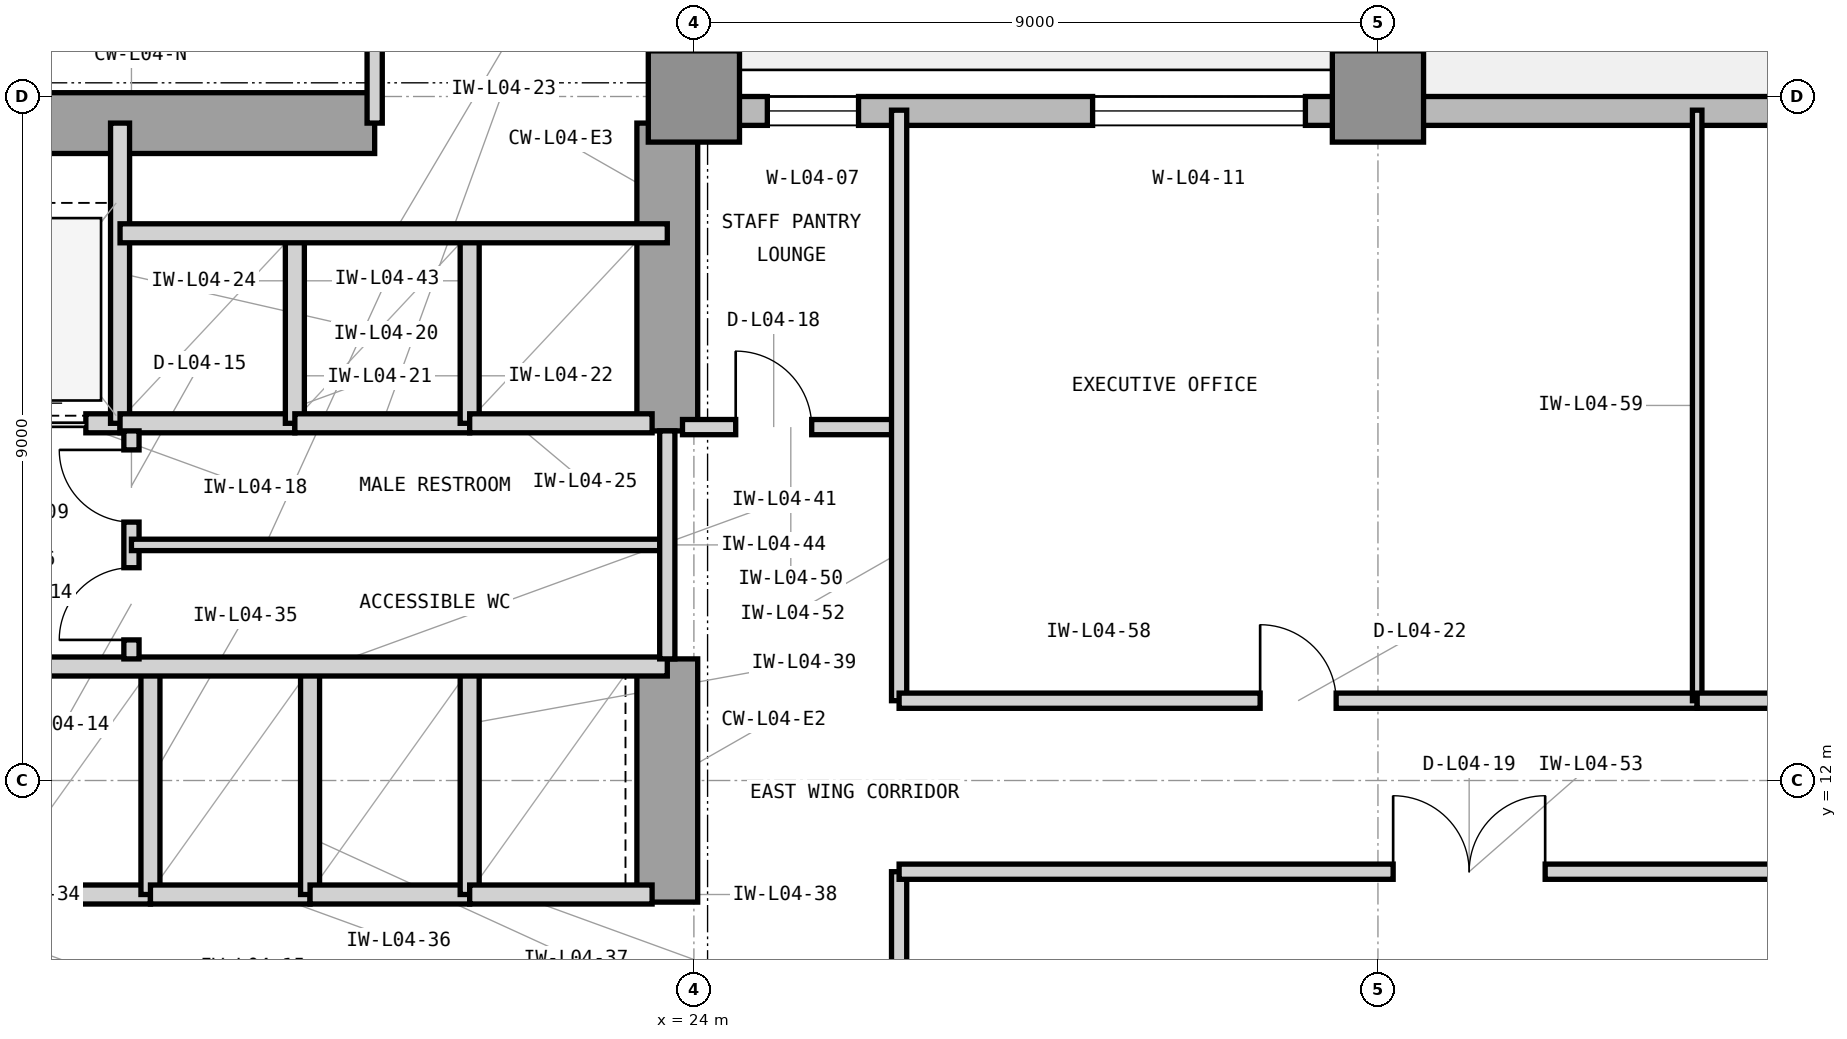
"""IFC4 building model, lengths in metres.
Left out: names, types, materials, properties, quantities, classifications, styles, units other than length and angle.
Written with IfcOpenShell. Run it as: python <this file> out.ifc"""

import sys

from ifc_helpers import new_model, si_unit, direction, frame, frame_2d, origin, origin_2d, place, context, subcontext, project, spatial, rectangle, extrude, element, fill, save


model = new_model("IFC4")
c1 = context("Model", 3, precision=1e-05, world=origin(), true_north=direction((0.0, 1.0)))
c2 = subcontext(c1, "Body", "Model", "MODEL_VIEW")
j1 = project(units=[si_unit("LENGTHUNIT", "METRE"), si_unit("PLANEANGLEUNIT", "RADIAN")], contexts=[c1])
p1 = place(None, origin())
s1 = spatial("IfcSite", under=j1, at=p1, CompositionType="ELEMENT")
p2 = place(p1, origin())
s2 = spatial("IfcBuilding", under=s1, at=p2, CompositionType="ELEMENT")
p3 = place(p2, frame((0.0, 0.0, 21.6)))
s3 = spatial("IfcBuildingStorey", under=s2, at=p3, CompositionType="ELEMENT", Elevation=21.6)
p4 = place(p3, frame((7.475, 20.65, 0.0), z_axis=(0.0, 0.0, 1.0), x_axis=(1.0, 0.0, 0.0)))
e1 = element("IfcWall", 1, at=p4, inside=s3, PredefinedType="SHEAR", context=c2, shape_type="SweptSolid", body=[
    extrude(rectangle(XDim=12.325, YDim=0.8, at=frame_2d((6.163, 0.0))), origin(), (0.0, 0.0, 1.0), 4.2),
])
p5 = place(p3, frame((23.65, 10.4, 0.0), z_axis=(0.0, 0.0, 1.0), x_axis=(0.0, 1.0, 0.0)))
e2 = element("IfcWall", 2, at=p5, inside=s3, PredefinedType="SHEAR", context=c2, shape_type="SweptSolid", body=[
    extrude(rectangle(XDim=3.2, YDim=0.8, at=frame_2d((1.6, 0.0))), origin(), (0.0, 0.0, 1.0), 4.2),
])
p6 = place(p3, frame((23.65, 16.6, 0.0), z_axis=(0.0, 0.0, 1.0), x_axis=(0.0, 1.0, 0.0)))
e3 = element("IfcWall", 3, at=p6, inside=s3, PredefinedType="SHEAR", context=c2, shape_type="SweptSolid", body=[
    extrude(rectangle(XDim=4.05, YDim=0.8, at=frame_2d((2.025, 0.0))), origin(), (0.0, 0.0, 1.0), 4.2),
])
for number, where, z_axis, x_axis in (
    (4, (24.0, 21.0, 0.0), (0.0, 0.0, 1.0), (1.0, 0.0, 0.0)),
    (5, (33.0, 21.0, 0.0), (0.0, 0.0, 1.0), (1.0, 0.0, 0.0)),
):
    element("IfcColumn", number, at=place(p3, frame(where, z_axis=z_axis, x_axis=x_axis)), inside=s3, PredefinedType="COLUMN", context=c2, shape_type="SweptSolid", body=[
        extrude(rectangle(XDim=1.2, YDim=1.2, at=origin_2d()), origin(), (0.0, 0.0, 1.0), 4.2),
    ])
p7 = place(p3, frame((64.4, 20.81, 0.0), z_axis=(0.0, 0.0, 1.0), x_axis=(-1.0, 0.0, 0.0)))
e6 = element("IfcWall", 6, at=p7, inside=s3, PredefinedType="STANDARD", context=c2, shape_type="SweptSolid", body=[
    extrude(rectangle(XDim=40.4, YDim=0.38, at=frame_2d((20.2, 0.0))), origin(), (0.0, 0.0, 1.0), 3.98),
])
p8 = place(p7, frame((23.6, 0.0, 0.0)))
e7 = element("IfcOpeningElement", 7, at=p8, cuts=e6, PredefinedType="OPENING", context=c2, shape_type="SweptSolid", body=[
    extrude(rectangle(XDim=1.8, YDim=2.35, at=frame_2d((0.9, 1.175))), frame((0.0, 0.2, 0.0), z_axis=(0.0, -1.0, 0.0), x_axis=(1.0, 0.0, 0.0)), (0.0, 0.0, 1.0), 0.4),
])
p9 = place(p7, frame((38.234, 0.0, 0.85)))
e8 = element("IfcOpeningElement", 8, at=p9, cuts=e6, PredefinedType="OPENING", context=c2, shape_type="SweptSolid", body=[
    extrude(rectangle(XDim=1.2, YDim=2.45, at=frame_2d((0.6, 1.225))), frame((0.0, 0.2, 0.0), z_axis=(0.0, -1.0, 0.0), x_axis=(1.0, 0.0, 0.0)), (0.0, 0.0, 1.0), 0.4),
])
p10 = place(p7, frame((32.354, 0.0, 0.85)))
e9 = element("IfcOpeningElement", 9, at=p10, cuts=e6, PredefinedType="OPENING", context=c2, shape_type="SweptSolid", body=[
    extrude(rectangle(XDim=2.8, YDim=2.45, at=frame_2d((1.4, 1.225))), frame((0.0, 0.2, 0.0), z_axis=(0.0, -1.0, 0.0), x_axis=(1.0, 0.0, 0.0)), (0.0, 0.0, 1.0), 0.4),
])
p11 = place(p7, frame((18.604, 0.0, 0.85)))
e10 = element("IfcOpeningElement", 10, at=p11, cuts=e6, PredefinedType="OPENING", context=c2, shape_type="SweptSolid", body=[
    extrude(rectangle(XDim=2.8, YDim=2.45, at=frame_2d((1.4, 1.225))), frame((0.0, 0.2, 0.0), z_axis=(0.0, -1.0, 0.0), x_axis=(1.0, 0.0, 0.0)), (0.0, 0.0, 1.0), 0.4),
])
p12 = place(p7, frame((11.154, 0.0, 0.85)))
e11 = element("IfcOpeningElement", 11, at=p12, cuts=e6, PredefinedType="OPENING", context=c2, shape_type="SweptSolid", body=[
    extrude(rectangle(XDim=1.2, YDim=2.45, at=frame_2d((0.6, 1.225))), frame((0.0, 0.2, 0.0), z_axis=(0.0, -1.0, 0.0), x_axis=(1.0, 0.0, 0.0)), (0.0, 0.0, 1.0), 0.4),
])
p13 = place(p3, frame((23.81, 21.0, 0.0), z_axis=(0.0, 0.0, 1.0), x_axis=(0.0, 1.0, 0.0)))
e12 = element("IfcWall", 12, at=p13, inside=s3, PredefinedType="STANDARD", context=c2, shape_type="SweptSolid", body=[
    extrude(rectangle(XDim=28.4, YDim=0.38, at=frame_2d((14.2, 0.0))), origin(), (0.0, 0.0, 1.0), 3.98),
])
p14 = place(p13, frame((10.433, 0.0, 0.85)))
e13 = element("IfcOpeningElement", 13, at=p14, cuts=e12, PredefinedType="OPENING", context=c2, shape_type="SweptSolid", body=[
    extrude(rectangle(XDim=2.8, YDim=2.45, at=frame_2d((1.4, 1.225))), frame((0.0, 0.2, 0.0), z_axis=(0.0, -1.0, 0.0), x_axis=(1.0, 0.0, 0.0)), (0.0, 0.0, 1.0), 0.4),
])
p15 = place(p13, frame((19.034, 0.0, 0.85)))
e14 = element("IfcOpeningElement", 14, at=p15, cuts=e12, PredefinedType="OPENING", context=c2, shape_type="SweptSolid", body=[
    extrude(rectangle(XDim=1.2, YDim=2.45, at=frame_2d((0.6, 1.225))), frame((0.0, 0.2, 0.0), z_axis=(0.0, -1.0, 0.0), x_axis=(1.0, 0.0, 0.0)), (0.0, 0.0, 1.0), 0.4),
])
p16 = place(p3, frame((14.15, 16.7, 0.0), z_axis=(0.0, 0.0, 1.0), x_axis=(1.0, 0.0, 0.0)))
e15 = element("IfcWall", 15, at=p16, inside=s3, PredefinedType="PARTITIONING", context=c2, shape_type="SweptSolid", body=[
    extrude(rectangle(XDim=2.3, YDim=0.25, at=frame_2d((1.15, 0.0))), origin(), (0.0, 0.0, 1.0), 3.426),
])
p17 = place(p16, frame((0.45, 0.0, 0.0)))
e16 = element("IfcOpeningElement", 16, at=p17, cuts=e15, PredefinedType="OPENING", context=c2, shape_type="SweptSolid", body=[
    extrude(rectangle(XDim=1.4, YDim=2.35, at=frame_2d((0.7, 1.175))), frame((0.0, 0.135, 0.0), z_axis=(0.0, -1.0, 0.0), x_axis=(1.0, 0.0, 0.0)), (0.0, 0.0, 1.0), 0.27),
])
p18 = place(p3, frame((16.45, 16.7, 0.0), z_axis=(0.0, 0.0, 1.0), x_axis=(0.0, 1.0, 0.0)))
e17 = element("IfcWall", 17, at=p18, inside=s3, PredefinedType="PARTITIONING", context=c2, shape_type="SweptSolid", body=[
    extrude(rectangle(XDim=3.95, YDim=0.25, at=frame_2d((1.975, 0.0))), origin(), (0.0, 0.0, 1.0), 3.97),
])
p19 = place(p3, frame((16.45, 16.7, 0.0), z_axis=(0.0, 0.0, 1.0), x_axis=(1.0, 0.0, 0.0)))
e18 = element("IfcWall", 18, at=p19, inside=s3, PredefinedType="PARTITIONING", context=c2, shape_type="SweptSolid", body=[
    extrude(rectangle(XDim=2.3, YDim=0.25, at=frame_2d((1.15, 0.0))), origin(), (0.0, 0.0, 1.0), 3.426),
])
p20 = place(p3, frame((18.75, 16.7, 0.0), z_axis=(0.0, 0.0, 1.0), x_axis=(0.0, 1.0, 0.0)))
e19 = element("IfcWall", 19, at=p20, inside=s3, PredefinedType="PARTITIONING", context=c2, shape_type="SweptSolid", body=[
    extrude(rectangle(XDim=2.5, YDim=0.25, at=frame_2d((1.25, 0.0))), origin(), (0.0, 0.0, 1.0), 3.97),
])
p21 = place(p3, frame((18.75, 16.7, 0.0), z_axis=(0.0, 0.0, 1.0), x_axis=(1.0, 0.0, 0.0)))
e20 = element("IfcWall", 20, at=p21, inside=s3, PredefinedType="PARTITIONING", context=c2, shape_type="SweptSolid", body=[
    extrude(rectangle(XDim=2.3, YDim=0.25, at=frame_2d((1.15, 0.0))), origin(), (0.0, 0.0, 1.0), 3.426),
])
p22 = place(p3, frame((21.05, 16.7, 0.0), z_axis=(0.0, 0.0, 1.0), x_axis=(0.0, 1.0, 0.0)))
e21 = element("IfcWall", 21, at=p22, inside=s3, PredefinedType="PARTITIONING", context=c2, shape_type="SweptSolid", body=[
    extrude(rectangle(XDim=2.5, YDim=0.25, at=frame_2d((1.25, 0.0))), origin(), (0.0, 0.0, 1.0), 3.97),
])
p23 = place(p3, frame((21.05, 16.7, 0.0), z_axis=(0.0, 0.0, 1.0), x_axis=(1.0, 0.0, 0.0)))
e22 = element("IfcWall", 22, at=p23, inside=s3, PredefinedType="PARTITIONING", context=c2, shape_type="SweptSolid", body=[
    extrude(rectangle(XDim=2.4, YDim=0.25, at=frame_2d((1.2, 0.0))), origin(), (0.0, 0.0, 1.0), 3.426),
])
p24 = place(p3, frame((16.45, 19.2, 0.0), z_axis=(0.0, 0.0, 1.0), x_axis=(1.0, 0.0, 0.0)))
e23 = element("IfcWall", 23, at=p24, inside=s3, PredefinedType="PARTITIONING", context=c2, shape_type="SweptSolid", body=[
    extrude(rectangle(XDim=7.2, YDim=0.25, at=frame_2d((3.6, 0.0))), origin(), (0.0, 0.0, 1.0), 3.97),
])
p25 = place(p3, frame((14.7, 10.5, 0.0), z_axis=(0.0, 0.0, 1.0), x_axis=(1.0, 0.0, 0.0)))
e24 = element("IfcWall", 24, at=p25, inside=s3, PredefinedType="PARTITIONING", context=c2, shape_type="SweptSolid", body=[
    extrude(rectangle(XDim=2.15, YDim=0.25, at=frame_2d((1.075, 0.0))), origin(), (0.0, 0.0, 1.0), 3.426),
])
p26 = place(p3, frame((16.85, 10.5, 0.0), z_axis=(0.0, 0.0, 1.0), x_axis=(0.0, 1.0, 0.0)))
e25 = element("IfcWall", 25, at=p26, inside=s3, PredefinedType="PARTITIONING", context=c2, shape_type="SweptSolid", body=[
    extrude(rectangle(XDim=3.0, YDim=0.25, at=frame_2d((1.5, 0.0))), origin(), (0.0, 0.0, 1.0), 3.97),
])
p27 = place(p3, frame((16.85, 10.5, 0.0), z_axis=(0.0, 0.0, 1.0), x_axis=(1.0, 0.0, 0.0)))
e26 = element("IfcWall", 26, at=p27, inside=s3, PredefinedType="PARTITIONING", context=c2, shape_type="SweptSolid", body=[
    extrude(rectangle(XDim=2.1, YDim=0.25, at=frame_2d((1.05, 0.0))), origin(), (0.0, 0.0, 1.0), 3.426),
])
p28 = place(p3, frame((18.95, 10.5, 0.0), z_axis=(0.0, 0.0, 1.0), x_axis=(0.0, 1.0, 0.0)))
e27 = element("IfcWall", 27, at=p28, inside=s3, PredefinedType="PARTITIONING", context=c2, shape_type="SweptSolid", body=[
    extrude(rectangle(XDim=3.0, YDim=0.25, at=frame_2d((1.5, 0.0))), origin(), (0.0, 0.0, 1.0), 3.97),
])
p29 = place(p3, frame((18.95, 10.5, 0.0), z_axis=(0.0, 0.0, 1.0), x_axis=(1.0, 0.0, 0.0)))
e28 = element("IfcWall", 28, at=p29, inside=s3, PredefinedType="PARTITIONING", context=c2, shape_type="SweptSolid", body=[
    extrude(rectangle(XDim=2.1, YDim=0.25, at=frame_2d((1.05, 0.0))), origin(), (0.0, 0.0, 1.0), 3.426),
])
p30 = place(p3, frame((21.05, 10.5, 0.0), z_axis=(0.0, 0.0, 1.0), x_axis=(0.0, 1.0, 0.0)))
e29 = element("IfcWall", 29, at=p30, inside=s3, PredefinedType="PARTITIONING", context=c2, shape_type="SweptSolid", body=[
    extrude(rectangle(XDim=3.0, YDim=0.25, at=frame_2d((1.5, 0.0))), origin(), (0.0, 0.0, 1.0), 3.97),
])
p31 = place(p3, frame((21.05, 10.5, 0.0), z_axis=(0.0, 0.0, 1.0), x_axis=(1.0, 0.0, 0.0)))
e30 = element("IfcWall", 30, at=p31, inside=s3, PredefinedType="PARTITIONING", context=c2, shape_type="SweptSolid", body=[
    extrude(rectangle(XDim=2.4, YDim=0.25, at=frame_2d((1.2, 0.0))), origin(), (0.0, 0.0, 1.0), 3.426),
])
p32 = place(p3, frame((14.7, 13.5, 0.0), z_axis=(0.0, 0.0, 1.0), x_axis=(1.0, 0.0, 0.0)))
e31 = element("IfcWall", 31, at=p32, inside=s3, PredefinedType="PARTITIONING", context=c2, shape_type="SweptSolid", body=[
    extrude(rectangle(XDim=8.95, YDim=0.25, at=frame_2d((4.475, 0.0))), origin(), (0.0, 0.0, 1.0), 3.426),
])
p33 = place(p3, frame((16.6, 13.6, 0.0), z_axis=(0.0, 0.0, 1.0), x_axis=(0.0, 1.0, 0.0)))
e32 = element("IfcWall", 32, at=p33, inside=s3, PredefinedType="PARTITIONING", context=c2, shape_type="SweptSolid", body=[
    extrude(rectangle(XDim=3.0, YDim=0.2, at=frame_2d((1.5, 0.0))), origin(), (0.0, 0.0, 1.0), 3.97),
])
p34 = place(p33, frame((0.25, 0.0, 0.0)))
e33 = element("IfcOpeningElement", 33, at=p34, cuts=e32, PredefinedType="OPENING", context=c2, shape_type="SweptSolid", body=[
    extrude(rectangle(XDim=0.95, YDim=2.1, at=frame_2d((0.475, 1.05))), frame((0.0, 0.11, 0.0), z_axis=(0.0, -1.0, 0.0), x_axis=(1.0, 0.0, 0.0)), (0.0, 0.0, 1.0), 0.22),
])
p35 = place(p33, frame((1.8, 0.0, 0.0)))
e34 = element("IfcOpeningElement", 34, at=p35, cuts=e32, PredefinedType="OPENING", context=c2, shape_type="SweptSolid", body=[
    extrude(rectangle(XDim=0.95, YDim=2.1, at=frame_2d((0.475, 1.05))), frame((0.0, 0.11, 0.0), z_axis=(0.0, -1.0, 0.0), x_axis=(1.0, 0.0, 0.0)), (0.0, 0.0, 1.0), 0.22),
])
p36 = place(p3, frame((16.6, 15.1, 0.0), z_axis=(0.0, 0.0, 1.0), x_axis=(1.0, 0.0, 0.0)))
e35 = element("IfcWall", 35, at=p36, inside=s3, PredefinedType="PARTITIONING", context=c2, shape_type="SweptSolid", body=[
    extrude(rectangle(XDim=7.05, YDim=0.15, at=frame_2d((3.525, 0.0))), origin(), (0.0, 0.0, 1.0), 3.97),
])
p37 = place(p3, frame((23.65, 13.6, 0.0), z_axis=(0.0, 0.0, 1.0), x_axis=(0.0, 1.0, 0.0)))
e36 = element("IfcWall", 36, at=p37, inside=s3, PredefinedType="PARTITIONING", context=c2, shape_type="SweptSolid", body=[
    extrude(rectangle(XDim=3.0, YDim=0.2, at=frame_2d((1.5, 0.0))), origin(), (0.0, 0.0, 1.0), 3.97),
])
p38 = place(p3, frame((23.85, 16.65, 0.0), z_axis=(0.0, 0.0, 1.0), x_axis=(1.0, 0.0, 0.0)))
e37 = element("IfcWall", 37, at=p38, inside=s3, PredefinedType="PARTITIONING", context=c2, shape_type="SweptSolid", body=[
    extrude(rectangle(XDim=2.85, YDim=0.2, at=frame_2d((1.425, 0.0))), origin(), (0.0, 0.0, 1.0), 3.97),
])
p39 = place(p38, frame((0.7, 0.0, 0.0)))
e38 = element("IfcOpeningElement", 38, at=p39, cuts=e37, PredefinedType="OPENING", context=c2, shape_type="SweptSolid", body=[
    extrude(rectangle(XDim=1.0, YDim=2.15, at=frame_2d((0.5, 1.075))), frame((0.0, 0.11, 0.0), z_axis=(0.0, -1.0, 0.0), x_axis=(1.0, 0.0, 0.0)), (0.0, 0.0, 1.0), 0.22),
])
p40 = place(p3, frame((26.7, 3.18, 0.0), z_axis=(0.0, 0.0, 1.0), x_axis=(0.0, 1.0, 0.0)))
e39 = element("IfcWall", 39, at=p40, inside=s3, PredefinedType="PARTITIONING", context=c2, shape_type="SweptSolid", body=[
    extrude(rectangle(XDim=7.62, YDim=0.2, at=frame_2d((3.81, 0.0))), origin(), (0.0, 0.0, 1.0), 3.97),
])
p41 = place(p3, frame((26.7, 13.05, 0.0), z_axis=(0.0, 0.0, 1.0), x_axis=(0.0, 1.0, 0.0)))
e40 = element("IfcWall", 40, at=p41, inside=s3, PredefinedType="PARTITIONING", context=c2, shape_type="SweptSolid", body=[
    extrude(rectangle(XDim=7.77, YDim=0.2, at=frame_2d((3.885, 0.0))), origin(), (0.0, 0.0, 1.0), 3.97),
])
p42 = place(p3, frame((26.7, 10.8, 0.0), z_axis=(0.0, 0.0, 1.0), x_axis=(1.0, 0.0, 0.0)))
e41 = element("IfcWall", 41, at=p42, inside=s3, PredefinedType="PARTITIONING", context=c2, shape_type="SweptSolid", body=[
    extrude(rectangle(XDim=15.0, YDim=0.2, at=frame_2d((7.5, 0.0))), origin(), (0.0, 0.0, 1.0), 3.97),
])
p43 = place(p42, frame((6.5, 0.0, 0.0)))
e42 = element("IfcOpeningElement", 42, at=p43, cuts=e41, PredefinedType="OPENING", context=c2, shape_type="SweptSolid", body=[
    extrude(rectangle(XDim=2.0, YDim=2.5, at=frame_2d((1.0, 1.25))), frame((0.0, 0.11, 0.0), z_axis=(0.0, -1.0, 0.0), x_axis=(1.0, 0.0, 0.0)), (0.0, 0.0, 1.0), 0.22),
])
p44 = place(p3, frame((26.7, 13.05, 0.0), z_axis=(0.0, 0.0, 1.0), x_axis=(1.0, 0.0, 0.0)))
e43 = element("IfcWall", 43, at=p44, inside=s3, PredefinedType="PARTITIONING", context=c2, shape_type="SweptSolid", body=[
    extrude(rectangle(XDim=10.5, YDim=0.2, at=frame_2d((5.25, 0.0))), origin(), (0.0, 0.0, 1.0), 3.97),
])
p45 = place(p44, frame((4.75, 0.0, 0.0)))
e44 = element("IfcOpeningElement", 44, at=p45, cuts=e43, PredefinedType="OPENING", context=c2, shape_type="SweptSolid", body=[
    extrude(rectangle(XDim=1.0, YDim=2.15, at=frame_2d((0.5, 1.075))), frame((0.0, 0.11, 0.0), z_axis=(0.0, -1.0, 0.0), x_axis=(1.0, 0.0, 0.0)), (0.0, 0.0, 1.0), 0.22),
])
p46 = place(p3, frame((37.2, 13.05, 0.0), z_axis=(0.0, 0.0, 1.0), x_axis=(0.0, 1.0, 0.0)))
e45 = element("IfcWall", 45, at=p46, inside=s3, PredefinedType="PARTITIONING", context=c2, shape_type="SweptSolid", body=[
    extrude(rectangle(XDim=7.77, YDim=0.125, at=frame_2d((3.885, 0.0))), origin(), (0.0, 0.0, 1.0), 3.97),
])
p47 = place(p3, frame((37.2, 13.05, 0.0), z_axis=(0.0, 0.0, 1.0), x_axis=(1.0, 0.0, 0.0)))
e46 = element("IfcWall", 46, at=p47, inside=s3, PredefinedType="PARTITIONING", context=c2, shape_type="SweptSolid", body=[
    extrude(rectangle(XDim=12.0, YDim=0.2, at=frame_2d((6.0, 0.0))), origin(), (0.0, 0.0, 1.0), 3.97),
])
p48 = place(p47, frame((5.5, 0.0, 0.0)))
e47 = element("IfcOpeningElement", 47, at=p48, cuts=e46, PredefinedType="OPENING", context=c2, shape_type="SweptSolid", body=[
    extrude(rectangle(XDim=1.0, YDim=2.15, at=frame_2d((0.5, 1.075))), frame((0.0, 0.11, 0.0), z_axis=(0.0, -1.0, 0.0), x_axis=(1.0, 0.0, 0.0)), (0.0, 0.0, 1.0), 0.22),
])
p49 = place(p3, frame((19.8, 20.65, 0.0), z_axis=(0.0, 0.0, 1.0), x_axis=(0.0, 1.0, 0.0)))
e48 = element("IfcWall", 48, at=p49, inside=s3, PredefinedType="PARTITIONING", context=c2, shape_type="SweptSolid", body=[
    extrude(rectangle(XDim=6.15, YDim=0.2, at=frame_2d((3.075, 0.0))), origin(), (0.0, 0.0, 1.0), 3.97),
])
p50 = place(p17, origin())
e49 = element("IfcDoor", 49, at=p50, inside=s3, OperationType="DOUBLE_DOOR_SLIDING", PredefinedType="DOOR", context=c2, shape_type="SweptSolid", body=[
    extrude(rectangle(XDim=1.4, YDim=2.35, at=frame_2d((0.7, 1.175))), frame((0.0, 0.025, 0.0), z_axis=(0.0, -1.0, 0.0), x_axis=(1.0, 0.0, 0.0)), (0.0, 0.0, 1.0), 0.05),
])
fill(e16, e49)
p51 = place(p34, origin())
e50 = element("IfcDoor", 50, at=p51, inside=s3, OperationType="SINGLE_SWING_LEFT", PredefinedType="DOOR", context=c2, shape_type="SweptSolid", body=[
    extrude(rectangle(XDim=0.95, YDim=2.1, at=frame_2d((0.475, 1.05))), frame((0.0, 0.025, 0.0), z_axis=(0.0, -1.0, 0.0), x_axis=(1.0, 0.0, 0.0)), (0.0, 0.0, 1.0), 0.05),
])
fill(e33, e50)
p52 = place(p35, origin())
e51 = element("IfcDoor", 51, at=p52, inside=s3, OperationType="SINGLE_SWING_RIGHT", PredefinedType="DOOR", context=c2, shape_type="SweptSolid", body=[
    extrude(rectangle(XDim=0.95, YDim=2.1, at=frame_2d((0.475, 1.05))), frame((0.0, 0.025, 0.0), z_axis=(0.0, -1.0, 0.0), x_axis=(1.0, 0.0, 0.0)), (0.0, 0.0, 1.0), 0.05),
])
fill(e34, e51)
p53 = place(p39, origin())
e52 = element("IfcDoor", 52, at=p53, inside=s3, OperationType="SINGLE_SWING_LEFT", PredefinedType="DOOR", context=c2, shape_type="SweptSolid", body=[
    extrude(rectangle(XDim=1.0, YDim=2.15, at=frame_2d((0.5, 1.075))), frame((0.0, 0.025, 0.0), z_axis=(0.0, -1.0, 0.0), x_axis=(1.0, 0.0, 0.0)), (0.0, 0.0, 1.0), 0.05),
])
fill(e38, e52)
p54 = place(p43, origin())
e53 = element("IfcDoor", 53, at=p54, inside=s3, OperationType="DOUBLE_DOOR_SINGLE_SWING", PredefinedType="DOOR", context=c2, shape_type="SweptSolid", body=[
    extrude(rectangle(XDim=2.0, YDim=2.5, at=frame_2d((1.0, 1.25))), frame((0.0, 0.025, 0.0), z_axis=(0.0, -1.0, 0.0), x_axis=(1.0, 0.0, 0.0)), (0.0, 0.0, 1.0), 0.05),
])
fill(e42, e53)
p55 = place(p45, origin())
e54 = element("IfcDoor", 54, at=p55, inside=s3, OperationType="SINGLE_SWING_LEFT", PredefinedType="DOOR", context=c2, shape_type="SweptSolid", body=[
    extrude(rectangle(XDim=1.0, YDim=2.15, at=frame_2d((0.5, 1.075))), frame((0.0, 0.025, 0.0), z_axis=(0.0, -1.0, 0.0), x_axis=(1.0, 0.0, 0.0)), (0.0, 0.0, 1.0), 0.05),
])
fill(e44, e54)
p56 = place(p9, origin())
e55 = element("IfcWindow", 55, at=p56, inside=s3, PartitioningType="SINGLE_PANEL", PredefinedType="WINDOW", context=c2, shape_type="SweptSolid", body=[
    extrude(rectangle(XDim=1.2, YDim=2.45, at=frame_2d((0.6, 1.225))), frame((0.0, 0.11, 0.0), z_axis=(0.0, -1.0, 0.0), x_axis=(1.0, 0.0, 0.0)), (0.0, 0.0, 1.0), 0.06),
])
fill(e8, e55)
p57 = place(p10, origin())
e56 = element("IfcWindow", 56, at=p57, inside=s3, PartitioningType="SINGLE_PANEL", PredefinedType="WINDOW", context=c2, shape_type="SweptSolid", body=[
    extrude(rectangle(XDim=2.8, YDim=2.45, at=frame_2d((1.4, 1.225))), frame((0.0, 0.11, 0.0), z_axis=(0.0, -1.0, 0.0), x_axis=(1.0, 0.0, 0.0)), (0.0, 0.0, 1.0), 0.06),
])
fill(e9, e56)
save(model, sys.argv[1])
